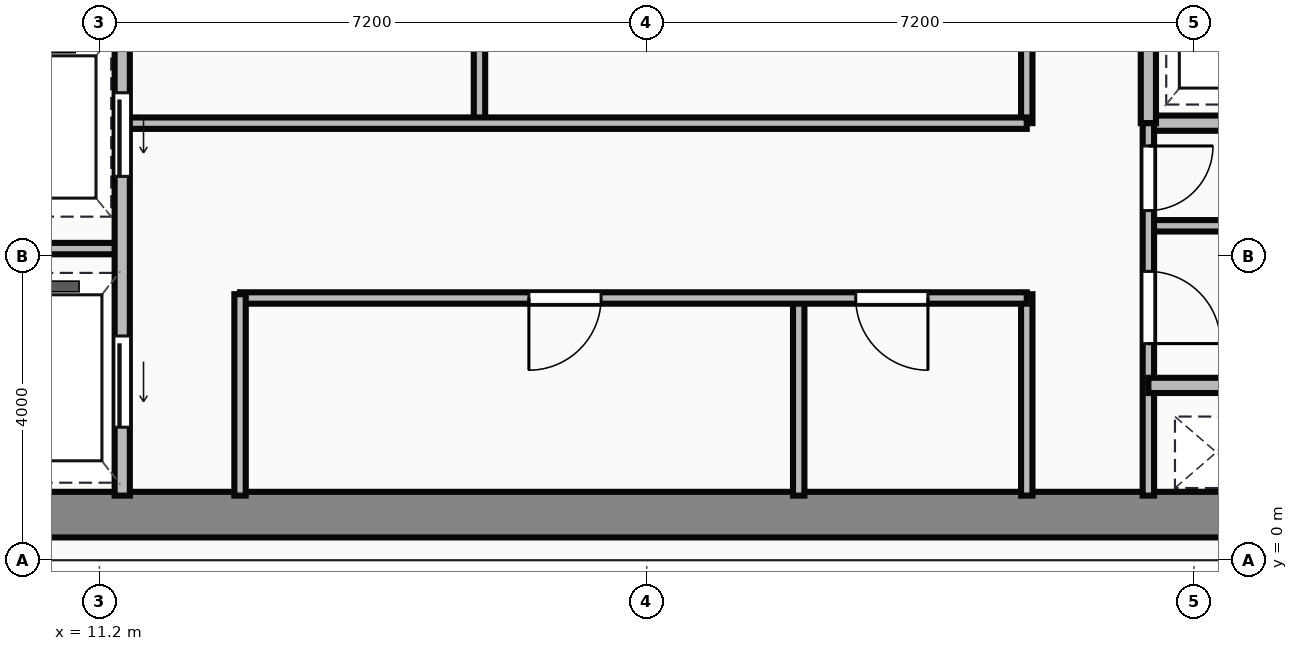
"""IFC4 building model, lengths in metres.
Left out: names, types, materials, properties, quantities, classifications, styles, units other than length and angle.
Written with IfcOpenShell. Run it as: python <this file> out.ifc"""

import sys

from ifc_helpers import new_model, si_unit, direction, frame, frame_2d, origin, place, context, subcontext, project, spatial, rectangle, extrude, source, transform, mapped, element, fill, save


model = new_model("IFC4")
c1 = context("Model", 3, precision=1e-05, world=origin(), true_north=direction((0.0, 1.0)))
c2 = subcontext(c1, "Body", "Model", "MODEL_VIEW")
j1 = project(units=[si_unit("LENGTHUNIT", "METRE"), si_unit("PLANEANGLEUNIT", "RADIAN")], contexts=[c1])
p1 = place(None, origin())
s1 = spatial("IfcSite", under=j1, at=p1, CompositionType="ELEMENT")
p2 = place(p1, origin())
s2 = spatial("IfcBuilding", under=s1, at=p2, CompositionType="ELEMENT")
p3 = place(p2, frame((0.0, 0.0, 262.45)))
s3 = spatial("IfcBuildingStorey", under=s2, at=p3, CompositionType="ELEMENT", Elevation=262.45)
m1 = source(origin(), c2, "Body", "SweptSolid", [
    extrude(rectangle(XDim=29.5, YDim=0.6, at=frame_2d((14.75, 0.0))), origin(), (0.0, 0.0, 1.0), 3.65),
])
p4 = place(p3, frame((4.5, 0.6, 0.0), z_axis=(0.0, 0.0, 1.0), x_axis=(1.0, 0.0, 0.0)))
e1 = element("IfcWall", 1, at=p4, inside=s3, PredefinedType="SHEAR", context=c2, shape_type="MappedRepresentation", body=[
    mapped(m1, transform((0.0, 0.0, 0.0))),
])
m2 = source(origin(), c2, "Body", "SweptSolid", [
    extrude(rectangle(XDim=9.6, YDim=0.2, at=frame_2d((4.8, 0.0))), origin(), (0.0, 0.0, 1.0), 3.4),
])
p5 = place(p3, frame((11.5, 0.85, 0.0), z_axis=(0.0, 0.0, 1.0), x_axis=(0.0, 1.0, 0.0)))
e2 = element("IfcWall", 2, at=p5, inside=s3, PredefinedType="PARTITIONING", context=c2, shape_type="MappedRepresentation", body=[
    mapped(m2, transform((0.0, 0.0, 0.0))),
])
p6 = place(p5, frame((4.2, 0.0, 0.0)))
e3 = element("IfcOpeningElement", 3, at=p6, cuts=e2, PredefinedType="OPENING", context=c2, shape_type="SweptSolid", body=[
    extrude(rectangle(XDim=1.1, YDim=2.15, at=frame_2d((0.55, 1.075))), frame((0.0, 0.11, 0.0), z_axis=(0.0, -1.0, 0.0), x_axis=(1.0, 0.0, 0.0)), (0.0, 0.0, 1.0), 0.22),
])
p7 = place(p5, frame((0.9, 0.0, 0.0)))
e4 = element("IfcOpeningElement", 4, at=p7, cuts=e2, PredefinedType="OPENING", context=c2, shape_type="SweptSolid", body=[
    extrude(rectangle(XDim=1.2, YDim=2.15, at=frame_2d((0.6, 1.075))), frame((0.0, 0.11, 0.0), z_axis=(0.0, -1.0, 0.0), x_axis=(1.0, 0.0, 0.0)), (0.0, 0.0, 1.0), 0.22),
])
m3 = source(origin(), c2, "Body", "SweptSolid", [
    extrude(rectangle(XDim=2.4, YDim=0.15, at=frame_2d((1.2, 0.0))), origin(), (0.0, 0.0, 1.0), 3.4),
])
p8 = place(p3, frame((9.1, 4.1, 0.0), z_axis=(0.0, 0.0, 1.0), x_axis=(1.0, 0.0, 0.0)))
e5 = element("IfcWall", 5, at=p8, inside=s3, PredefinedType="PARTITIONING", context=c2, shape_type="MappedRepresentation", body=[
    mapped(m3, transform((0.0, 0.0, 0.0))),
])
m4 = source(origin(), c2, "Body", "SweptSolid", [
    extrude(rectangle(XDim=2.65, YDim=0.15, at=frame_2d((1.325, 0.0))), origin(), (0.0, 0.0, 1.0), 3.4),
])
p9 = place(p3, frame((13.05, 0.85, 0.0), z_axis=(0.0, 0.0, 1.0), x_axis=(0.0, 1.0, 0.0)))
e6 = element("IfcWall", 6, at=p9, inside=s3, PredefinedType="PARTITIONING", context=c2, shape_type="MappedRepresentation", body=[
    mapped(m4, transform((0.0, 0.0, 0.0))),
])
m5 = source(origin(), c2, "Body", "SweptSolid", [
    extrude(rectangle(XDim=10.35, YDim=0.15, at=frame_2d((5.175, 0.0))), origin(), (0.0, 0.0, 1.0), 3.4),
])
p10 = place(p3, frame((13.05, 3.45, 0.0), z_axis=(0.0, 0.0, 1.0), x_axis=(1.0, 0.0, 0.0)))
e7 = element("IfcWall", 7, at=p10, inside=s3, PredefinedType="PARTITIONING", context=c2, shape_type="MappedRepresentation", body=[
    mapped(m5, transform((0.0, 0.0, 0.0))),
])
p11 = place(p10, frame((3.8, 0.0, 0.0)))
e8 = element("IfcOpeningElement", 8, at=p11, cuts=e7, PredefinedType="OPENING", context=c2, shape_type="SweptSolid", body=[
    extrude(rectangle(XDim=0.95, YDim=2.15, at=frame_2d((0.475, 1.075))), frame((0.0, 0.085, 0.0), z_axis=(0.0, -1.0, 0.0), x_axis=(1.0, 0.0, 0.0)), (0.0, 0.0, 1.0), 0.17),
])
p12 = place(p10, frame((8.1, 0.0, 0.0)))
e9 = element("IfcOpeningElement", 9, at=p12, cuts=e7, PredefinedType="OPENING", context=c2, shape_type="SweptSolid", body=[
    extrude(rectangle(XDim=0.95, YDim=2.15, at=frame_2d((0.475, 1.075))), frame((0.0, 0.085, 0.0), z_axis=(0.0, -1.0, 0.0), x_axis=(1.0, 0.0, 0.0)), (0.0, 0.0, 1.0), 0.17),
])
p13 = place(p3, frame((23.4, 0.85, 0.0), z_axis=(0.0, 0.0, 1.0), x_axis=(0.0, 1.0, 0.0)))
e10 = element("IfcWall", 10, at=p13, inside=s3, PredefinedType="PARTITIONING", context=c2, shape_type="MappedRepresentation", body=[
    mapped(m4, transform((0.0, 0.0, 0.0))),
])
m6 = source(origin(), c2, "Body", "SweptSolid", [
    extrude(rectangle(XDim=2.6, YDim=0.15, at=frame_2d((1.3, 0.0))), origin(), (0.0, 0.0, 1.0), 3.4),
])
p14 = place(p3, frame((20.4, 0.85, 0.0), z_axis=(0.0, 0.0, 1.0), x_axis=(0.0, 1.0, 0.0)))
e11 = element("IfcWall", 11, at=p14, inside=s3, PredefinedType="PARTITIONING", context=c2, shape_type="MappedRepresentation", body=[
    mapped(m6, transform((0.0, 0.0, 0.0))),
])
m7 = source(origin(), c2, "Body", "SweptSolid", [
    extrude(rectangle(XDim=11.85, YDim=0.15, at=frame_2d((5.925, 0.0))), origin(), (0.0, 0.0, 1.0), 3.4),
])
p15 = place(p3, frame((11.55, 5.75, 0.0), z_axis=(0.0, 0.0, 1.0), x_axis=(1.0, 0.0, 0.0)))
e12 = element("IfcWall", 12, at=p15, inside=s3, PredefinedType="PARTITIONING", context=c2, shape_type="MappedRepresentation", body=[
    mapped(m7, transform((0.0, 0.0, 0.0))),
])
m8 = source(origin(), c2, "Body", "SweptSolid", [
    extrude(rectangle(XDim=2.6, YDim=0.15, at=frame_2d((1.3, 0.0))), origin(), (0.0, 0.0, 1.0), 3.4),
])
p16 = place(p3, frame((23.4, 5.75, 0.0), z_axis=(0.0, 0.0, 1.0), x_axis=(0.0, 1.0, 0.0)))
e13 = element("IfcWall", 13, at=p16, inside=s3, PredefinedType="PARTITIONING", context=c2, shape_type="MappedRepresentation", body=[
    mapped(m8, transform((0.0, 0.0, 0.0))),
])
m9 = source(origin(), c2, "Body", "SweptSolid", [
    extrude(rectangle(XDim=2.5, YDim=0.15, at=frame_2d((1.25, 0.0))), origin(), (0.0, 0.0, 1.0), 3.4),
])
p17 = place(p3, frame((16.2, 5.8, 0.0), z_axis=(0.0, 0.0, 1.0), x_axis=(0.0, 1.0, 0.0)))
e14 = element("IfcWall", 14, at=p17, inside=s3, PredefinedType="PARTITIONING", context=c2, shape_type="MappedRepresentation", body=[
    mapped(m9, transform((0.0, 0.0, 0.0))),
])
m10 = source(origin(), c2, "Body", "SweptSolid", [
    extrude(rectangle(XDim=4.55, YDim=0.2, at=frame_2d((2.275, 0.0))), origin(), (0.0, 0.0, 1.0), 3.4),
])
p18 = place(p3, frame((25.0, 5.75, 0.0), z_axis=(0.0, 0.0, 1.0), x_axis=(1.0, 0.0, 0.0)))
e15 = element("IfcWall", 15, at=p18, inside=s3, PredefinedType="PARTITIONING", context=c2, shape_type="MappedRepresentation", body=[
    mapped(m10, transform((0.0, 0.0, 0.0))),
])
m11 = source(origin(), c2, "Body", "SweptSolid", [
    extrude(rectangle(XDim=2.6, YDim=0.2, at=frame_2d((1.3, 0.0))), origin(), (0.0, 0.0, 1.0), 3.4),
])
p19 = place(p3, frame((25.0, 5.75, 0.0), z_axis=(0.0, 0.0, 1.0), x_axis=(0.0, 1.0, 0.0)))
e16 = element("IfcWall", 16, at=p19, inside=s3, PredefinedType="PARTITIONING", context=c2, shape_type="MappedRepresentation", body=[
    mapped(m11, transform((0.0, 0.0, 0.0))),
])
m12 = source(origin(), c2, "Body", "SweptSolid", [
    extrude(rectangle(XDim=4.9, YDim=0.15, at=frame_2d((2.45, 0.0))), origin(), (0.0, 0.0, 1.0), 3.4),
])
p20 = place(p3, frame((25.0, 0.85, 0.0), z_axis=(0.0, 0.0, 1.0), x_axis=(0.0, 1.0, 0.0)))
e17 = element("IfcWall", 17, at=p20, inside=s3, PredefinedType="PARTITIONING", context=c2, shape_type="MappedRepresentation", body=[
    mapped(m12, transform((0.0, 0.0, 0.0))),
])
p21 = place(p20, frame((2.0, 0.0, 0.0)))
e18 = element("IfcOpeningElement", 18, at=p21, cuts=e17, PredefinedType="OPENING", context=c2, shape_type="SweptSolid", body=[
    extrude(rectangle(XDim=0.95, YDim=2.15, at=frame_2d((0.475, 1.075))), frame((0.0, 0.085, 0.0), z_axis=(0.0, -1.0, 0.0), x_axis=(1.0, 0.0, 0.0)), (0.0, 0.0, 1.0), 0.17),
])
p22 = place(p20, frame((3.75, 0.0, 0.0)))
e19 = element("IfcOpeningElement", 19, at=p22, cuts=e17, PredefinedType="OPENING", context=c2, shape_type="SweptSolid", body=[
    extrude(rectangle(XDim=0.85, YDim=2.15, at=frame_2d((0.425, 1.075))), frame((0.0, 0.085, 0.0), z_axis=(0.0, -1.0, 0.0), x_axis=(1.0, 0.0, 0.0)), (0.0, 0.0, 1.0), 0.17),
])
m13 = source(origin(), c2, "Body", "SweptSolid", [
    extrude(rectangle(XDim=2.4, YDim=0.2, at=frame_2d((1.2, 0.0))), origin(), (0.0, 0.0, 1.0), 3.4),
])
p23 = place(p3, frame((25.0, 2.3, 0.0), z_axis=(0.0, 0.0, 1.0), x_axis=(1.0, 0.0, 0.0)))
e20 = element("IfcWall", 20, at=p23, inside=s3, PredefinedType="PARTITIONING", context=c2, shape_type="MappedRepresentation", body=[
    mapped(m13, transform((0.0, 0.0, 0.0))),
])
m14 = source(origin(), c2, "Body", "SweptSolid", [
    extrude(rectangle(XDim=4.55, YDim=0.15, at=frame_2d((2.275, 0.0))), origin(), (0.0, 0.0, 1.0), 3.4),
])
p24 = place(p3, frame((25.0, 4.4, 0.0), z_axis=(0.0, 0.0, 1.0), x_axis=(1.0, 0.0, 0.0)))
e21 = element("IfcWall", 21, at=p24, inside=s3, PredefinedType="PARTITIONING", context=c2, shape_type="MappedRepresentation", body=[
    mapped(m14, transform((0.0, 0.0, 0.0))),
])
m15 = source(origin(), c2, "Body", "SweptSolid", [
    extrude(rectangle(XDim=1.1, YDim=2.15, at=frame_2d((0.55, 1.075))), frame((0.0, 0.025, 0.0), z_axis=(0.0, -1.0, 0.0), x_axis=(1.0, 0.0, 0.0)), (0.0, 0.0, 1.0), 0.05),
])
p25 = place(p6, frame((1.1, 0.0, 0.0), z_axis=(0.0, 0.0, 1.0), x_axis=(-1.0, 0.0, 0.0)))
e22 = element("IfcDoor", 22, at=p25, inside=s3, OperationType="SLIDING_TO_LEFT", PredefinedType="DOOR", context=c2, shape_type="MappedRepresentation", body=[
    mapped(m15, transform((0.0, 0.0, 0.0))),
])
fill(e3, e22)
m16 = source(origin(), c2, "Body", "SweptSolid", [
    extrude(rectangle(XDim=1.2, YDim=2.15, at=frame_2d((0.6, 1.075))), frame((0.0, 0.025, 0.0), z_axis=(0.0, -1.0, 0.0), x_axis=(1.0, 0.0, 0.0)), (0.0, 0.0, 1.0), 0.05),
])
p26 = place(p7, frame((1.2, 0.0, 0.0), z_axis=(0.0, 0.0, 1.0), x_axis=(-1.0, 0.0, 0.0)))
e23 = element("IfcDoor", 23, at=p26, inside=s3, OperationType="SLIDING_TO_LEFT", PredefinedType="DOOR", context=c2, shape_type="MappedRepresentation", body=[
    mapped(m16, transform((0.0, 0.0, 0.0))),
])
fill(e4, e23)
m17 = source(origin(), c2, "Body", "SweptSolid", [
    extrude(rectangle(XDim=0.95, YDim=2.15, at=frame_2d((0.475, 1.075))), frame((0.0, 0.025, 0.0), z_axis=(0.0, -1.0, 0.0), x_axis=(1.0, 0.0, 0.0)), (0.0, 0.0, 1.0), 0.05),
])
p27 = place(p11, origin())
e24 = element("IfcDoor", 24, at=p27, inside=s3, OperationType="SINGLE_SWING_LEFT", PredefinedType="DOOR", context=c2, shape_type="MappedRepresentation", body=[
    mapped(m17, transform((0.0, 0.0, 0.0))),
])
fill(e8, e24)
p28 = place(p12, origin())
e25 = element("IfcDoor", 25, at=p28, inside=s3, OperationType="SINGLE_SWING_RIGHT", PredefinedType="DOOR", context=c2, shape_type="MappedRepresentation", body=[
    mapped(m17, transform((0.0, 0.0, 0.0))),
])
fill(e9, e25)
p29 = place(p21, origin())
e26 = element("IfcDoor", 26, at=p29, inside=s3, OperationType="SINGLE_SWING_LEFT", PredefinedType="DOOR", context=c2, shape_type="MappedRepresentation", body=[
    mapped(m17, transform((0.0, 0.0, 0.0))),
])
fill(e18, e26)
m18 = source(origin(), c2, "Body", "SweptSolid", [
    extrude(rectangle(XDim=0.85, YDim=2.15, at=frame_2d((0.425, 1.075))), frame((0.0, 0.025, 0.0), z_axis=(0.0, -1.0, 0.0), x_axis=(1.0, 0.0, 0.0)), (0.0, 0.0, 1.0), 0.05),
])
p30 = place(p22, origin())
e27 = element("IfcDoor", 27, at=p30, inside=s3, OperationType="SINGLE_SWING_RIGHT", PredefinedType="DOOR", context=c2, shape_type="MappedRepresentation", body=[
    mapped(m18, transform((0.0, 0.0, 0.0))),
])
fill(e19, e27)
save(model, sys.argv[1])
